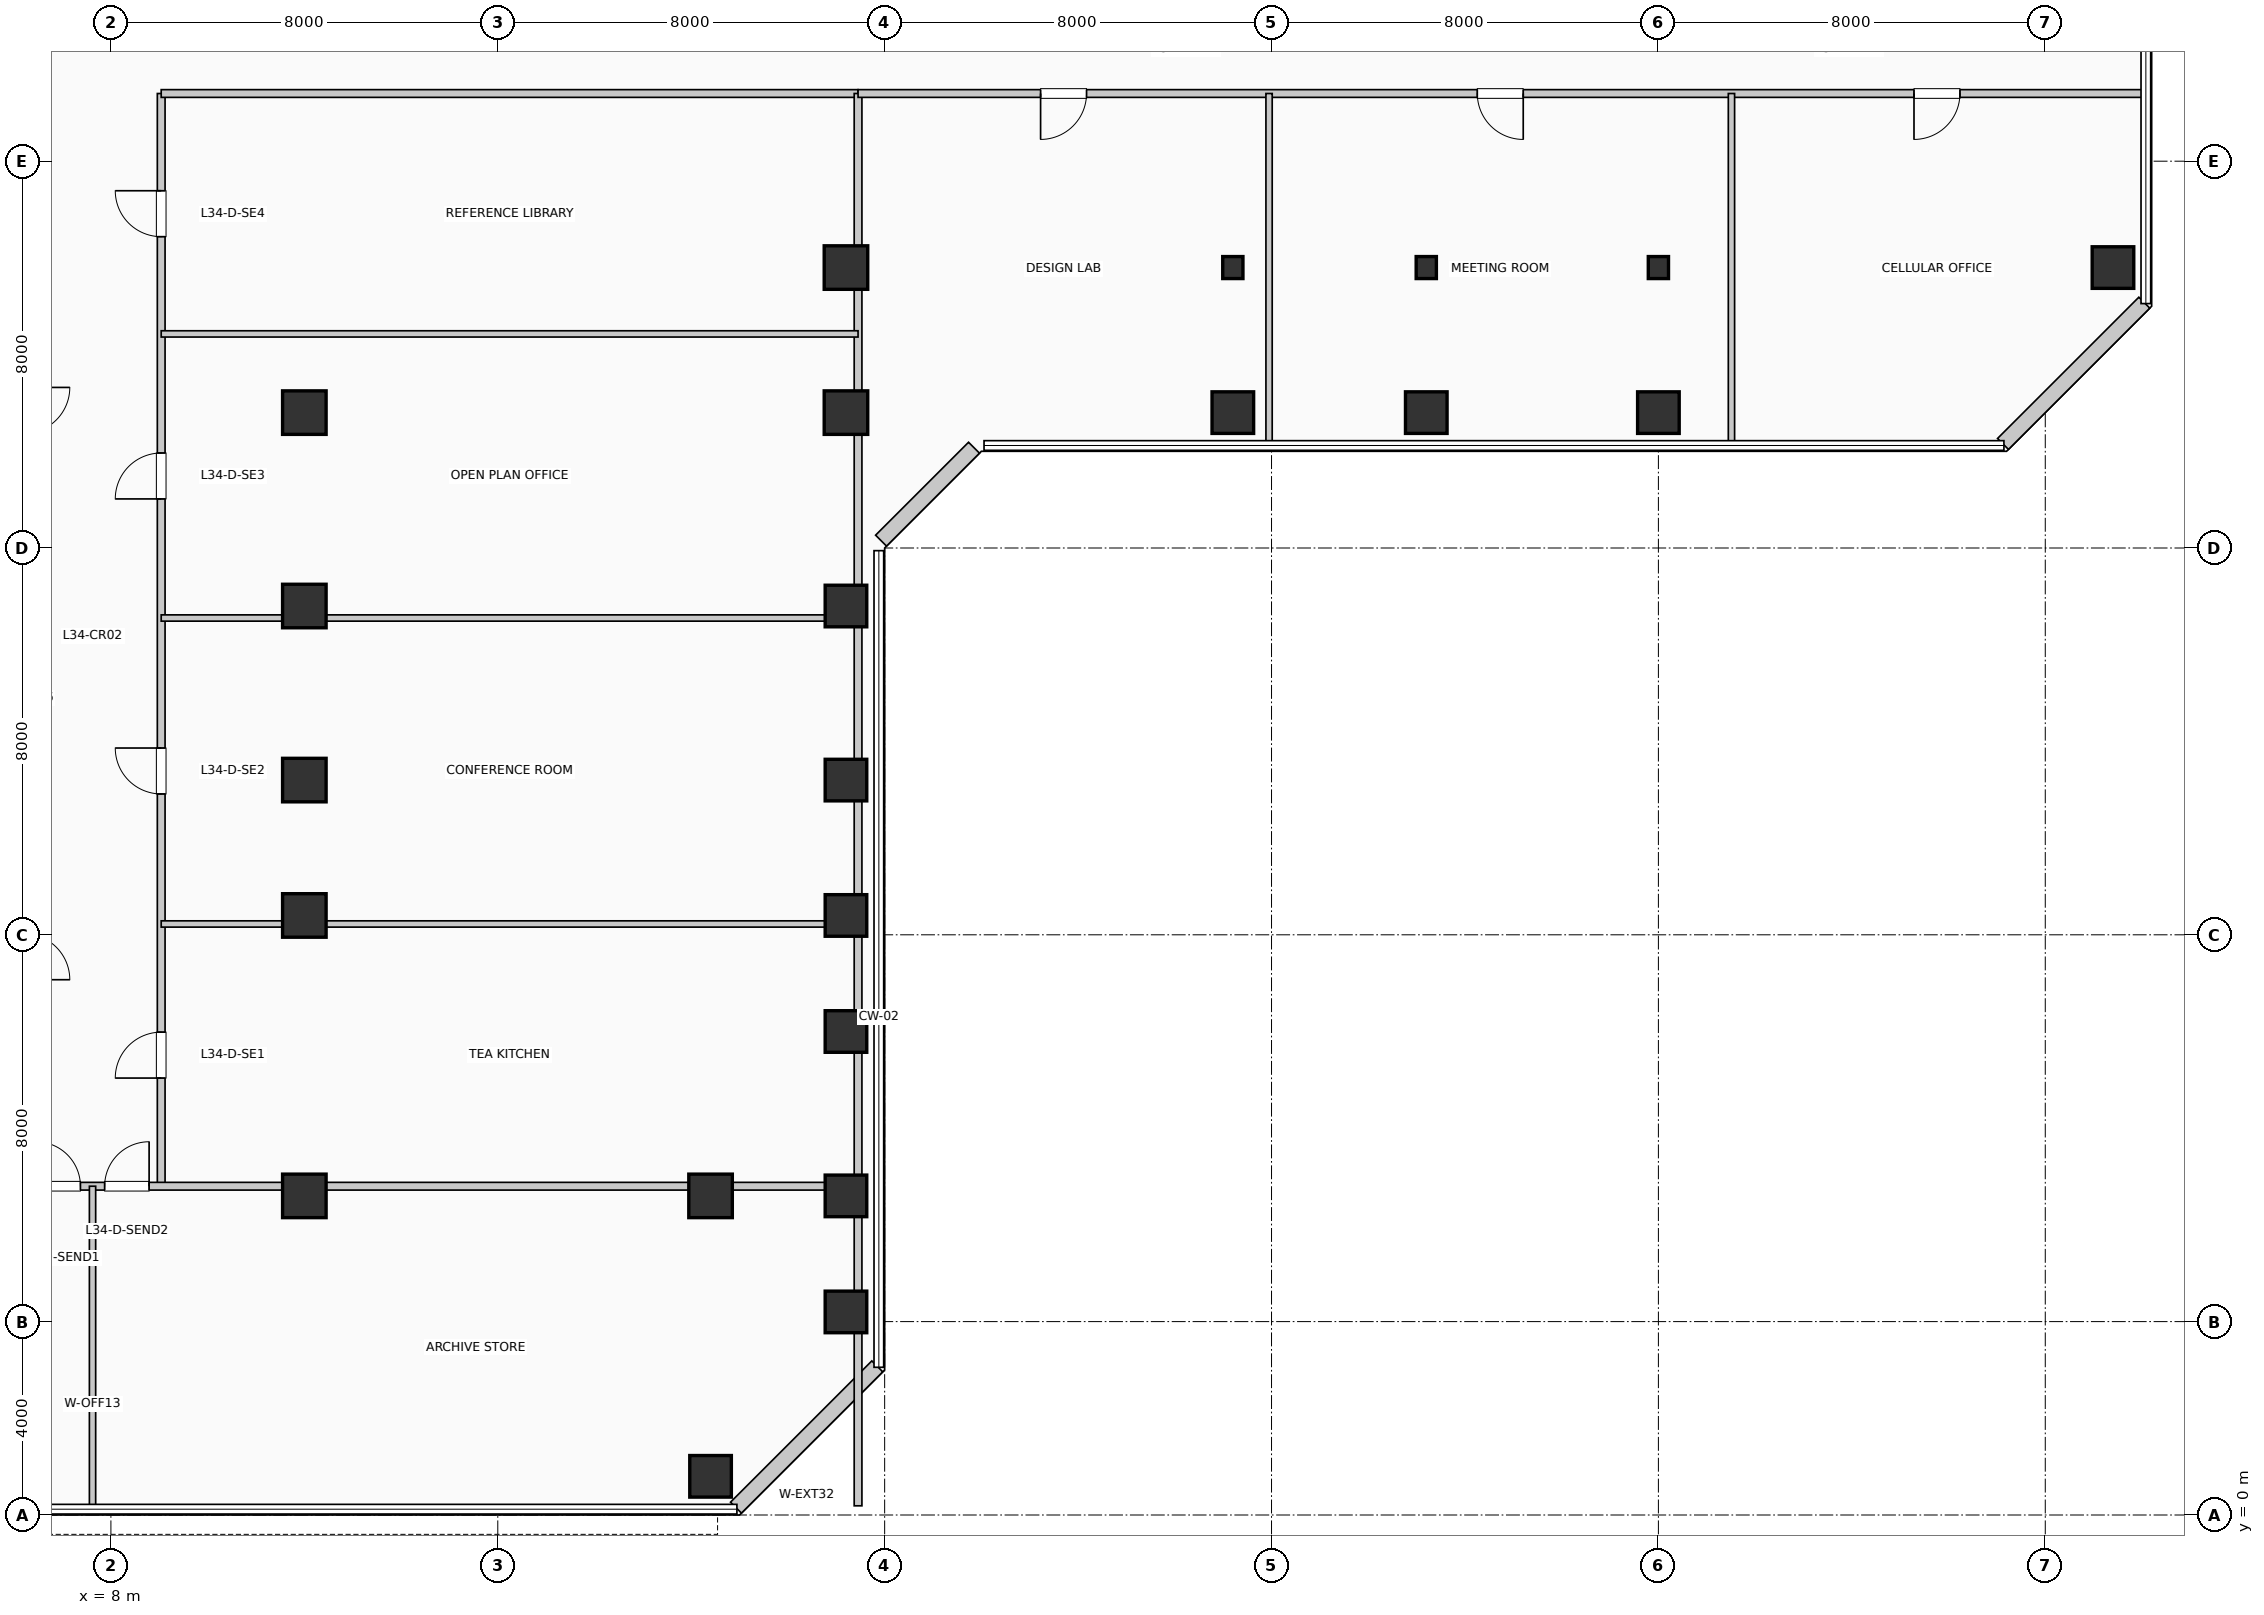
"""IFC4 building model, lengths in metres.
Left out: names, types, materials, properties, quantities, classifications, styles, units other than length and angle.
Written with IfcOpenShell. Run it as: python <this file> out.ifc"""

import sys

from ifc_helpers import new_model, si_unit, direction, frame, frame_2d, origin, origin_2d, place, context, subcontext, project, spatial, rectangle, i_section, extrude, element, fill, save


model = new_model("IFC4")
c1 = context("Model", 3, precision=1e-05, world=origin(), true_north=direction((0.0, 1.0)))
c2 = subcontext(c1, "Body", "Model", "MODEL_VIEW")
j1 = project(units=[si_unit("LENGTHUNIT", "METRE"), si_unit("PLANEANGLEUNIT", "RADIAN")], contexts=[c1])
p1 = place(None, origin())
s1 = spatial("IfcSite", under=j1, at=p1, CompositionType="ELEMENT")
p2 = place(p1, origin())
s2 = spatial("IfcBuilding", under=s1, at=p2, CompositionType="ELEMENT")
p3 = place(p2, frame((0.0, 0.0, 142.89)))
s3 = spatial("IfcBuildingStorey", under=s2, at=p3, CompositionType="ELEMENT", Elevation=142.89)
for number, where, z_axis, x_axis in (
    (1, (12.0, 6.6, 0.0), (0.0, 0.0, 1.0), (1.0, 0.0, 0.0)),
    (2, (12.0, 12.4, 0.0), (0.0, 0.0, 1.0), (1.0, 0.0, 0.0)),
    (3, (12.0, 15.2, 0.0), (0.0, 0.0, 1.0), (1.0, 0.0, 0.0)),
    (4, (12.0, 18.8, 0.0), (0.0, 0.0, 1.0), (1.0, 0.0, 0.0)),
    (5, (12.0, 22.8, 0.0), (0.0, 0.0, 1.0), (1.0, 0.0, 0.0)),
):
    element("IfcColumn", number, at=place(p3, frame(where, z_axis=z_axis, x_axis=x_axis)), inside=s3, PredefinedType="COLUMN", context=c2, shape_type="SweptSolid", body=[
        extrude(rectangle(XDim=0.9, YDim=0.9, at=origin_2d()), origin(), (0.0, 0.0, 1.0), 3.96),
    ])
p4 = place(p3, frame((20.4, 0.8, 0.0), z_axis=(0.0, 0.0, 1.0), x_axis=(1.0, 0.0, 0.0)))
e6 = element("IfcColumn", 6, at=p4, inside=s3, PredefinedType="COLUMN", context=c2, shape_type="SweptSolid", body=[
    extrude(rectangle(XDim=0.86, YDim=0.86, at=origin_2d()), origin(), (0.0, 0.0, 1.0), 3.96),
])
p5 = place(p3, frame((20.4, 6.6, 0.0), z_axis=(0.0, 0.0, 1.0), x_axis=(1.0, 0.0, 0.0)))
e7 = element("IfcColumn", 7, at=p5, inside=s3, PredefinedType="COLUMN", context=c2, shape_type="SweptSolid", body=[
    extrude(rectangle(XDim=0.9, YDim=0.9, at=origin_2d()), origin(), (0.0, 0.0, 1.0), 3.96),
])
for number, where, z_axis, x_axis in (
    (8, (23.2, 4.2, 0.0), (0.0, 0.0, 1.0), (1.0, 0.0, 0.0)),
    (9, (23.2, 6.6, 0.0), (0.0, 0.0, 1.0), (1.0, 0.0, 0.0)),
    (10, (23.2, 10.0, 0.0), (0.0, 0.0, 1.0), (1.0, 0.0, 0.0)),
    (11, (23.2, 12.4, 0.0), (0.0, 0.0, 1.0), (1.0, 0.0, 0.0)),
    (12, (23.2, 15.2, 0.0), (0.0, 0.0, 1.0), (1.0, 0.0, 0.0)),
    (13, (23.2, 18.8, 0.0), (0.0, 0.0, 1.0), (1.0, 0.0, 0.0)),
):
    element("IfcColumn", number, at=place(p3, frame(where, z_axis=z_axis, x_axis=x_axis)), inside=s3, PredefinedType="COLUMN", context=c2, shape_type="SweptSolid", body=[
        extrude(rectangle(XDim=0.86, YDim=0.86, at=origin_2d()), origin(), (0.0, 0.0, 1.0), 3.96),
    ])
for number, where, z_axis, x_axis in (
    (14, (23.2, 22.8, 0.0), (0.0, 0.0, 1.0), (1.0, 0.0, 0.0)),
    (15, (23.2, 25.8, 0.0), (0.0, 0.0, 1.0), (1.0, 0.0, 0.0)),
):
    element("IfcColumn", number, at=place(p3, frame(where, z_axis=z_axis, x_axis=x_axis)), inside=s3, PredefinedType="COLUMN", context=c2, shape_type="SweptSolid", body=[
        extrude(rectangle(XDim=0.9, YDim=0.9, at=origin_2d()), origin(), (0.0, 0.0, 1.0), 3.96),
    ])
p6 = place(p3, frame((31.2, 22.8, 0.0), z_axis=(0.0, 0.0, 1.0), x_axis=(1.0, 0.0, 0.0)))
e16 = element("IfcColumn", 16, at=p6, inside=s3, PredefinedType="COLUMN", context=c2, shape_type="SweptSolid", body=[
    extrude(rectangle(XDim=0.86, YDim=0.86, at=origin_2d()), origin(), (0.0, 0.0, 1.0), 3.96),
])
p7 = place(p3, frame((31.2, 25.8, 0.0), z_axis=(0.0, 0.0, 1.0), x_axis=(1.0, 0.0, 0.0)))
e17 = element("IfcColumn", 17, at=p7, inside=s3, PredefinedType="COLUMN", context=c2, shape_type="SweptSolid", body=[
    extrude(i_section(OverallWidth=0.418, OverallDepth=0.455, WebThickness=0.032, FlangeThickness=0.051, at=origin_2d()), origin(), (0.0, 0.0, 1.0), 3.96),
])
p8 = place(p3, frame((35.2, 22.8, 0.0), z_axis=(0.0, 0.0, 1.0), x_axis=(1.0, 0.0, 0.0)))
e18 = element("IfcColumn", 18, at=p8, inside=s3, PredefinedType="COLUMN", context=c2, shape_type="SweptSolid", body=[
    extrude(rectangle(XDim=0.86, YDim=0.86, at=origin_2d()), origin(), (0.0, 0.0, 1.0), 3.96),
])
p9 = place(p3, frame((35.2, 25.8, 0.0), z_axis=(0.0, 0.0, 1.0), x_axis=(1.0, 0.0, 0.0)))
e19 = element("IfcColumn", 19, at=p9, inside=s3, PredefinedType="COLUMN", context=c2, shape_type="SweptSolid", body=[
    extrude(i_section(OverallWidth=0.418, OverallDepth=0.455, WebThickness=0.032, FlangeThickness=0.051, at=origin_2d()), origin(), (0.0, 0.0, 1.0), 3.96),
])
p10 = place(p3, frame((40.0, 22.8, 0.0), z_axis=(0.0, 0.0, 1.0), x_axis=(1.0, 0.0, 0.0)))
e20 = element("IfcColumn", 20, at=p10, inside=s3, PredefinedType="COLUMN", context=c2, shape_type="SweptSolid", body=[
    extrude(rectangle(XDim=0.86, YDim=0.86, at=origin_2d()), origin(), (0.0, 0.0, 1.0), 3.96),
])
p11 = place(p3, frame((40.0, 25.8, 0.0), z_axis=(0.0, 0.0, 1.0), x_axis=(1.0, 0.0, 0.0)))
e21 = element("IfcColumn", 21, at=p11, inside=s3, PredefinedType="COLUMN", context=c2, shape_type="SweptSolid", body=[
    extrude(i_section(OverallWidth=0.418, OverallDepth=0.455, WebThickness=0.032, FlangeThickness=0.051, at=origin_2d()), origin(), (0.0, 0.0, 1.0), 3.96),
])
p12 = place(p3, frame((49.4, 25.8, 0.0), z_axis=(0.0, 0.0, 1.0), x_axis=(1.0, 0.0, 0.0)))
e22 = element("IfcColumn", 22, at=p12, inside=s3, PredefinedType="COLUMN", context=c2, shape_type="SweptSolid", body=[
    extrude(rectangle(XDim=0.86, YDim=0.86, at=origin_2d()), origin(), (0.0, 0.0, 1.0), 3.96),
])
p13 = place(p3, frame((20.926, 0.152, 0.0), z_axis=(0.0, 0.0, 1.0), x_axis=(0.707106781187, 0.707106781187, 0.0)))
e23 = element("IfcWall", 23, at=p13, inside=s3, PredefinedType="SOLIDWALL", context=c2, shape_type="SweptSolid", body=[
    extrude(rectangle(XDim=4.133, YDim=0.32, at=frame_2d((2.066, 0.0))), origin(), (0.0, 0.0, 1.0), 3.71),
])
p14 = place(p3, frame((23.926, 20.152, 0.0), z_axis=(0.0, 0.0, 1.0), x_axis=(0.707106781187, 0.707106781187, 0.0)))
e24 = element("IfcWall", 24, at=p14, inside=s3, PredefinedType="SOLIDWALL", context=c2, shape_type="SweptSolid", body=[
    extrude(rectangle(XDim=2.718, YDim=0.32, at=frame_2d((1.359, 0.0))), origin(), (0.0, 0.0, 1.0), 3.71),
])
p15 = place(p3, frame((47.126, 22.152, 0.0), z_axis=(0.0, 0.0, 1.0), x_axis=(0.707136318428, 0.707077242712, 0.0)))
e25 = element("IfcWall", 25, at=p15, inside=s3, PredefinedType="SOLIDWALL", context=c2, shape_type="SweptSolid", body=[
    extrude(rectangle(XDim=4.133, YDim=0.32, at=frame_2d((2.066, 0.0))), origin(), (0.0, 0.0, 1.0), 3.71),
])
p16 = place(p3, frame((9.04, 6.8, 0.0), z_axis=(0.0, 0.0, 1.0), x_axis=(0.0, 1.0, 0.0)))
e26 = element("IfcWall", 26, at=p16, inside=s3, PredefinedType="PARTITIONING", context=c2, shape_type="SweptSolid", body=[
    extrude(rectangle(XDim=22.6, YDim=0.16, at=frame_2d((11.3, 0.0))), origin(), (0.0, 0.0, 1.0), 3.71),
])
p17 = place(p16, frame((2.237, 0.0, 0.0)))
e27 = element("IfcOpeningElement", 27, at=p17, cuts=e26, PredefinedType="OPENING", context=c2, shape_type="SweptSolid", body=[
    extrude(rectangle(XDim=0.95, YDim=2.15, at=frame_2d((0.475, 1.075))), frame((0.0, 0.09, 0.0), z_axis=(0.0, -1.0, 0.0), x_axis=(1.0, 0.0, 0.0)), (0.0, 0.0, 1.0), 0.18),
])
p18 = place(p16, frame((8.113, 0.0, 0.0)))
e28 = element("IfcOpeningElement", 28, at=p18, cuts=e26, PredefinedType="OPENING", context=c2, shape_type="SweptSolid", body=[
    extrude(rectangle(XDim=0.95, YDim=2.15, at=frame_2d((0.475, 1.075))), frame((0.0, 0.09, 0.0), z_axis=(0.0, -1.0, 0.0), x_axis=(1.0, 0.0, 0.0)), (0.0, 0.0, 1.0), 0.18),
])
p19 = place(p16, frame((14.215, 0.0, 0.0)))
e29 = element("IfcOpeningElement", 29, at=p19, cuts=e26, PredefinedType="OPENING", context=c2, shape_type="SweptSolid", body=[
    extrude(rectangle(XDim=0.95, YDim=2.15, at=frame_2d((0.475, 1.075))), frame((0.0, 0.09, 0.0), z_axis=(0.0, -1.0, 0.0), x_axis=(1.0, 0.0, 0.0)), (0.0, 0.0, 1.0), 0.18),
])
p20 = place(p16, frame((19.639, 0.0, 0.0)))
e30 = element("IfcOpeningElement", 30, at=p20, cuts=e26, PredefinedType="OPENING", context=c2, shape_type="SweptSolid", body=[
    extrude(rectangle(XDim=0.95, YDim=2.15, at=frame_2d((0.475, 1.075))), frame((0.0, 0.09, 0.0), z_axis=(0.0, -1.0, 0.0), x_axis=(1.0, 0.0, 0.0)), (0.0, 0.0, 1.0), 0.18),
])
p21 = place(p3, frame((0.19, 6.8, 0.0), z_axis=(0.0, 0.0, 1.0), x_axis=(1.0, 0.0, 0.0)))
e31 = element("IfcWall", 31, at=p21, inside=s3, PredefinedType="PARTITIONING", context=c2, shape_type="SweptSolid", body=[
    extrude(rectangle(XDim=23.26, YDim=0.16, at=frame_2d((11.63, 0.0))), origin(), (0.0, 0.0, 1.0), 3.045),
])
p22 = place(p21, frame((6.26, 0.0, 0.0)))
e32 = element("IfcOpeningElement", 32, at=p22, cuts=e31, PredefinedType="OPENING", context=c2, shape_type="SweptSolid", body=[
    extrude(rectangle(XDim=0.92, YDim=2.1, at=frame_2d((0.46, 1.05))), frame((0.0, 0.09, 0.0), z_axis=(0.0, -1.0, 0.0), x_axis=(1.0, 0.0, 0.0)), (0.0, 0.0, 1.0), 0.18),
])
p23 = place(p21, frame((7.68, 0.0, 0.0)))
e33 = element("IfcOpeningElement", 33, at=p23, cuts=e31, PredefinedType="OPENING", context=c2, shape_type="SweptSolid", body=[
    extrude(rectangle(XDim=0.92, YDim=2.1, at=frame_2d((0.46, 1.05))), frame((0.0, 0.09, 0.0), z_axis=(0.0, -1.0, 0.0), x_axis=(1.0, 0.0, 0.0)), (0.0, 0.0, 1.0), 0.18),
])
p24 = place(p3, frame((9.04, 29.4, 0.0), z_axis=(0.0, 0.0, 1.0), x_axis=(1.0, 0.0, 0.0)))
e34 = element("IfcWall", 34, at=p24, inside=s3, PredefinedType="PARTITIONING", context=c2, shape_type="SweptSolid", body=[
    extrude(rectangle(XDim=14.41, YDim=0.16, at=frame_2d((7.205, 0.0))), origin(), (0.0, 0.0, 1.0), 3.365),
])
p25 = place(p3, frame((23.45, 0.19, 0.0), z_axis=(0.0, 0.0, 1.0), x_axis=(0.0, 1.0, 0.0)))
e35 = element("IfcWall", 35, at=p25, inside=s3, PredefinedType="PARTITIONING", context=c2, shape_type="SweptSolid", body=[
    extrude(rectangle(XDim=29.21, YDim=0.16, at=frame_2d((14.605, 0.0))), origin(), (0.0, 0.0, 1.0), 3.045),
])
p26 = place(p3, frame((7.62, 0.19, 0.0), z_axis=(0.0, 0.0, 1.0), x_axis=(0.0, 1.0, 0.0)))
e36 = element("IfcWall", 36, at=p26, inside=s3, PredefinedType="PARTITIONING", context=c2, shape_type="SweptSolid", body=[
    extrude(rectangle(XDim=6.61, YDim=0.13, at=frame_2d((3.305, 0.0))), origin(), (0.0, 0.0, 1.0), 3.71),
])
for number, where, z_axis, x_axis in (
    (37, (9.04, 12.224, 0.0), (0.0, 0.0, 1.0), (1.0, 0.0, 0.0)),
    (38, (9.04, 18.552, 0.0), (0.0, 0.0, 1.0), (1.0, 0.0, 0.0)),
):
    element("IfcWall", number, at=place(p3, frame(where, z_axis=z_axis, x_axis=x_axis)), inside=s3, PredefinedType="PARTITIONING", context=c2, shape_type="SweptSolid", body=[
        extrude(rectangle(XDim=14.41, YDim=0.13, at=frame_2d((7.205, 0.0))), origin(), (0.0, 0.0, 1.0), 3.045),
    ])
p27 = place(p3, frame((9.04, 24.428, 0.0), z_axis=(0.0, 0.0, 1.0), x_axis=(1.0, 0.0, 0.0)))
e39 = element("IfcWall", 39, at=p27, inside=s3, PredefinedType="PARTITIONING", context=c2, shape_type="SweptSolid", body=[
    extrude(rectangle(XDim=14.41, YDim=0.13, at=frame_2d((7.205, 0.0))), origin(), (0.0, 0.0, 1.0), 3.71),
])
p28 = place(p3, frame((23.45, 29.4, 0.0), z_axis=(0.0, 0.0, 1.0), x_axis=(1.0, 0.0, 0.0)))
e40 = element("IfcWall", 40, at=p28, inside=s3, PredefinedType="PARTITIONING", context=c2, shape_type="SweptSolid", body=[
    extrude(rectangle(XDim=26.56, YDim=0.16, at=frame_2d((13.28, 0.0))), origin(), (0.0, 0.0, 1.0), 3.365),
])
p29 = place(p28, frame((4.725, 0.0, 0.0), z_axis=(0.0, 0.0, 1.0), x_axis=(-1.0, 0.0, 0.0)))
e41 = element("IfcOpeningElement", 41, at=p29, cuts=e40, PredefinedType="OPENING", context=c2, shape_type="SweptSolid", body=[
    extrude(rectangle(XDim=0.95, YDim=2.15, at=frame_2d((0.475, 1.075))), frame((0.0, 0.09, 0.0), z_axis=(0.0, -1.0, 0.0), x_axis=(1.0, 0.0, 0.0)), (0.0, 0.0, 1.0), 0.18),
])
p30 = place(p28, frame((13.755, 0.0, 0.0), z_axis=(0.0, 0.0, 1.0), x_axis=(-1.0, 0.0, 0.0)))
e42 = element("IfcOpeningElement", 42, at=p30, cuts=e40, PredefinedType="OPENING", context=c2, shape_type="SweptSolid", body=[
    extrude(rectangle(XDim=0.95, YDim=2.15, at=frame_2d((0.475, 1.075))), frame((0.0, 0.09, 0.0), z_axis=(0.0, -1.0, 0.0), x_axis=(1.0, 0.0, 0.0)), (0.0, 0.0, 1.0), 0.18),
])
p31 = place(p28, frame((22.785, 0.0, 0.0), z_axis=(0.0, 0.0, 1.0), x_axis=(-1.0, 0.0, 0.0)))
e43 = element("IfcOpeningElement", 43, at=p31, cuts=e40, PredefinedType="OPENING", context=c2, shape_type="SweptSolid", body=[
    extrude(rectangle(XDim=0.95, YDim=2.15, at=frame_2d((0.475, 1.075))), frame((0.0, 0.09, 0.0), z_axis=(0.0, -1.0, 0.0), x_axis=(1.0, 0.0, 0.0)), (0.0, 0.0, 1.0), 0.18),
])
for number, where, z_axis, x_axis in (
    (44, (31.949, 22.19, 0.0), (0.0, 0.0, 1.0), (0.0, 1.0, 0.0)),
    (45, (41.511, 22.19, 0.0), (0.0, 0.0, 1.0), (0.0, 1.0, 0.0)),
):
    element("IfcWall", number, at=place(p3, frame(where, z_axis=z_axis, x_axis=x_axis)), inside=s3, PredefinedType="PARTITIONING", context=c2, shape_type="SweptSolid", body=[
        extrude(rectangle(XDim=7.21, YDim=0.13, at=frame_2d((3.605, 0.0))), origin(), (0.0, 0.0, 1.0), 3.71),
    ])
p32 = place(p22, origin())
e46 = element("IfcDoor", 46, at=p32, inside=s3, OperationType="SINGLE_SWING_LEFT", PredefinedType="DOOR", context=c2, shape_type="SweptSolid", body=[
    extrude(rectangle(XDim=0.92, YDim=2.1, at=frame_2d((0.46, 1.05))), frame((0.0, 0.025, 0.0), z_axis=(0.0, -1.0, 0.0), x_axis=(1.0, 0.0, 0.0)), (0.0, 0.0, 1.0), 0.05),
])
fill(e32, e46)
p33 = place(p23, origin())
e47 = element("IfcDoor", 47, at=p33, inside=s3, OperationType="SINGLE_SWING_RIGHT", PredefinedType="DOOR", context=c2, shape_type="SweptSolid", body=[
    extrude(rectangle(XDim=0.92, YDim=2.1, at=frame_2d((0.46, 1.05))), frame((0.0, 0.025, 0.0), z_axis=(0.0, -1.0, 0.0), x_axis=(1.0, 0.0, 0.0)), (0.0, 0.0, 1.0), 0.05),
])
fill(e33, e47)
p34 = place(p17, origin())
e48 = element("IfcDoor", 48, at=p34, inside=s3, OperationType="SINGLE_SWING_LEFT", PredefinedType="DOOR", context=c2, shape_type="SweptSolid", body=[
    extrude(rectangle(XDim=0.95, YDim=2.15, at=frame_2d((0.475, 1.075))), frame((0.0, 0.025, 0.0), z_axis=(0.0, -1.0, 0.0), x_axis=(1.0, 0.0, 0.0)), (0.0, 0.0, 1.0), 0.05),
])
fill(e27, e48)
p35 = place(p18, origin())
e49 = element("IfcDoor", 49, at=p35, inside=s3, OperationType="SINGLE_SWING_RIGHT", PredefinedType="DOOR", context=c2, shape_type="SweptSolid", body=[
    extrude(rectangle(XDim=0.95, YDim=2.15, at=frame_2d((0.475, 1.075))), frame((0.0, 0.025, 0.0), z_axis=(0.0, -1.0, 0.0), x_axis=(1.0, 0.0, 0.0)), (0.0, 0.0, 1.0), 0.05),
])
fill(e28, e49)
p36 = place(p19, origin())
e50 = element("IfcDoor", 50, at=p36, inside=s3, OperationType="SINGLE_SWING_LEFT", PredefinedType="DOOR", context=c2, shape_type="SweptSolid", body=[
    extrude(rectangle(XDim=0.95, YDim=2.15, at=frame_2d((0.475, 1.075))), frame((0.0, 0.025, 0.0), z_axis=(0.0, -1.0, 0.0), x_axis=(1.0, 0.0, 0.0)), (0.0, 0.0, 1.0), 0.05),
])
fill(e29, e50)
p37 = place(p20, origin())
e51 = element("IfcDoor", 51, at=p37, inside=s3, OperationType="SINGLE_SWING_RIGHT", PredefinedType="DOOR", context=c2, shape_type="SweptSolid", body=[
    extrude(rectangle(XDim=0.95, YDim=2.15, at=frame_2d((0.475, 1.075))), frame((0.0, 0.025, 0.0), z_axis=(0.0, -1.0, 0.0), x_axis=(1.0, 0.0, 0.0)), (0.0, 0.0, 1.0), 0.05),
])
fill(e30, e51)
p38 = place(p29, origin())
e52 = element("IfcDoor", 52, at=p38, inside=s3, OperationType="SINGLE_SWING_LEFT", PredefinedType="DOOR", context=c2, shape_type="SweptSolid", body=[
    extrude(rectangle(XDim=0.95, YDim=2.15, at=frame_2d((0.475, 1.075))), frame((0.0, 0.025, 0.0), z_axis=(0.0, -1.0, 0.0), x_axis=(1.0, 0.0, 0.0)), (0.0, 0.0, 1.0), 0.05),
])
fill(e41, e52)
p39 = place(p30, origin())
e53 = element("IfcDoor", 53, at=p39, inside=s3, OperationType="SINGLE_SWING_RIGHT", PredefinedType="DOOR", context=c2, shape_type="SweptSolid", body=[
    extrude(rectangle(XDim=0.95, YDim=2.15, at=frame_2d((0.475, 1.075))), frame((0.0, 0.025, 0.0), z_axis=(0.0, -1.0, 0.0), x_axis=(1.0, 0.0, 0.0)), (0.0, 0.0, 1.0), 0.05),
])
fill(e42, e53)
p40 = place(p31, origin())
e54 = element("IfcDoor", 54, at=p40, inside=s3, OperationType="SINGLE_SWING_LEFT", PredefinedType="DOOR", context=c2, shape_type="SweptSolid", body=[
    extrude(rectangle(XDim=0.95, YDim=2.15, at=frame_2d((0.475, 1.075))), frame((0.0, 0.025, 0.0), z_axis=(0.0, -1.0, 0.0), x_axis=(1.0, 0.0, 0.0)), (0.0, 0.0, 1.0), 0.05),
])
fill(e43, e54)
save(model, sys.argv[1])
